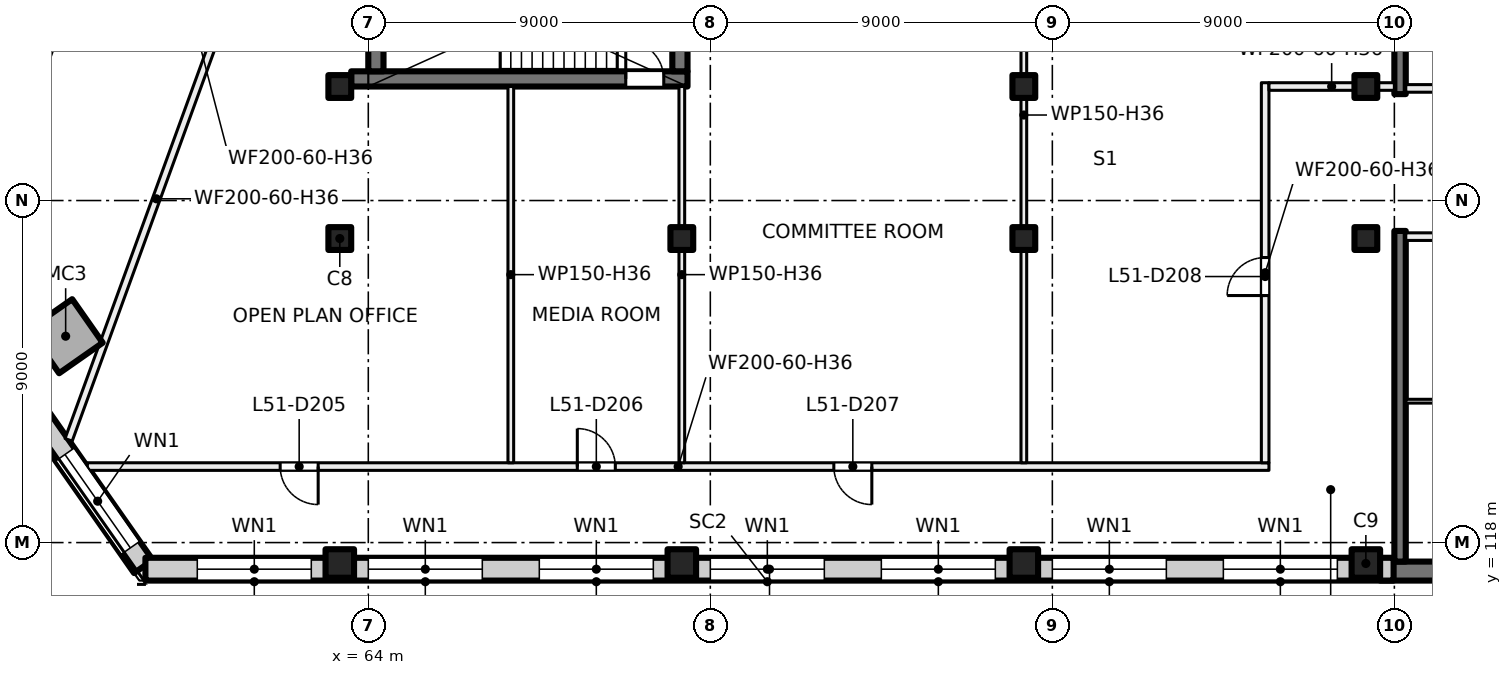
"""IFC4 building model, lengths in metres.
Left out: names, types, materials, properties, quantities, classifications, styles, units other than length and angle.
Written with IfcOpenShell. Run it as: python <this file> out.ifc"""

import sys

from ifc_helpers import new_model, si_unit, direction, frame, frame_2d, origin, origin_2d, place, context, subcontext, project, spatial, rectangle, hollow_rectangle, extrude, element, fill, save


model = new_model("IFC4")
c1 = context("Model", 3, precision=1e-05, world=origin(), true_north=direction((0.0, 1.0)))
c2 = subcontext(c1, "Body", "Model", "MODEL_VIEW")
j1 = project(units=[si_unit("LENGTHUNIT", "METRE"), si_unit("PLANEANGLEUNIT", "RADIAN")], contexts=[c1])
p1 = place(None, origin())
s1 = spatial("IfcSite", under=j1, at=p1, CompositionType="ELEMENT")
p2 = place(p1, origin())
s2 = spatial("IfcBuilding", under=s1, at=p2, CompositionType="ELEMENT")
p3 = place(p2, frame((0.0, 0.0, 216.0)))
s3 = spatial("IfcBuildingStorey", under=s2, at=p3, CompositionType="ELEMENT", Elevation=216.0)
p4 = place(p3, frame((56.036, 123.43, 0.0), z_axis=(0.0, 0.0, 1.0), x_axis=(0.573576436351, -0.819152044289, 0.0)))
e1 = element("IfcColumn", 1, at=p4, inside=s3, PredefinedType="COLUMN", context=c2, shape_type="SweptSolid", body=[
    extrude(hollow_rectangle(XDim=1.4, YDim=1.4, WallThickness=0.032, at=origin_2d()), origin(), (0.0, 0.0, 1.0), 4.0),
])
for number, where, z_axis, x_axis in (
    (2, (63.25, 130.0, 0.0), (0.0, 0.0, 1.0), (1.0, 0.0, 0.0)),
    (3, (81.25, 130.0, 0.0), (0.0, 0.0, 1.0), (1.0, 0.0, 0.0)),
    (4, (90.25, 130.0, 0.0), (0.0, 0.0, 1.0), (1.0, 0.0, 0.0)),
    (5, (63.25, 126.0, 0.0), (0.0, 0.0, 1.0), (1.0, 0.0, 0.0)),
    (6, (72.25, 126.0, 0.0), (0.0, 0.0, 1.0), (1.0, 0.0, 0.0)),
    (7, (81.25, 126.0, 0.0), (0.0, 0.0, 1.0), (1.0, 0.0, 0.0)),
    (8, (90.25, 126.0, 0.0), (0.0, 0.0, 1.0), (1.0, 0.0, 0.0)),
):
    element("IfcColumn", number, at=place(p3, frame(where, z_axis=z_axis, x_axis=x_axis)), inside=s3, PredefinedType="COLUMN", context=c2, shape_type="SweptSolid", body=[
        extrude(rectangle(XDim=0.6, YDim=0.6, at=origin_2d()), origin(), (0.0, 0.0, 1.0), 4.0),
    ])
for number, where, z_axis, x_axis in (
    (9, (63.25, 117.45, 0.0), (0.0, 0.0, 1.0), (1.0, 0.0, 0.0)),
    (10, (72.25, 117.45, 0.0), (0.0, 0.0, 1.0), (1.0, 0.0, 0.0)),
    (11, (81.25, 117.45, 0.0), (0.0, 0.0, 1.0), (1.0, 0.0, 0.0)),
    (12, (90.25, 117.45, 0.0), (0.0, 0.0, 1.0), (1.0, 0.0, 0.0)),
):
    element("IfcColumn", number, at=place(p3, frame(where, z_axis=z_axis, x_axis=x_axis)), inside=s3, PredefinedType="COLUMN", context=c2, shape_type="SweptSolid", body=[
        extrude(rectangle(XDim=0.75, YDim=0.75, at=origin_2d()), origin(), (0.0, 0.0, 1.0), 4.0),
    ])
p5 = place(p3, frame((99.6, 117.25, 0.0), z_axis=(0.0, 0.0, 1.0), x_axis=(-1.0, 0.0, 0.0)))
e13 = element("IfcWall", 13, at=p5, inside=s3, PredefinedType="SHEAR", context=c2, shape_type="SweptSolid", body=[
    extrude(rectangle(XDim=8.975, YDim=0.5, at=frame_2d((4.488, 0.0))), origin(), (0.0, 0.0, 1.0), 4.0),
])
for number, where, z_axis, x_axis in (
    (14, (91.15, 138.5, 0.0), (0.0, 0.0, 1.0), (0.0, -1.0, 0.0)),
    (15, (91.15, 126.2, 0.0), (0.0, 0.0, 1.0), (0.0, -1.0, 0.0)),
):
    element("IfcWall", number, at=place(p3, frame(where, z_axis=z_axis, x_axis=x_axis)), inside=s3, PredefinedType="SHEAR", context=c2, shape_type="SweptSolid", body=[
        extrude(rectangle(XDim=8.7, YDim=0.3, at=frame_2d((4.35, 0.0))), origin(), (0.0, 0.0, 1.0), 4.0),
    ])
p6 = place(p3, frame((63.55, 130.2, 0.0), z_axis=(0.0, 0.0, 1.0), x_axis=(1.0, 0.0, 0.0)))
e16 = element("IfcWall", 16, at=p6, inside=s3, PredefinedType="SHEAR", context=c2, shape_type="SweptSolid", body=[
    extrude(rectangle(XDim=8.85, YDim=0.4, at=frame_2d((4.425, 0.0))), origin(), (0.0, 0.0, 1.0), 4.0),
])
p7 = place(p6, frame((7.225, 0.0, 0.0)))
e17 = element("IfcOpeningElement", 17, at=p7, cuts=e16, PredefinedType="OPENING", context=c2, shape_type="SweptSolid", body=[
    extrude(rectangle(XDim=1.0, YDim=2.1, at=frame_2d((0.5, 1.05))), frame((0.0, 0.21, 0.0), z_axis=(0.0, -1.0, 0.0), x_axis=(1.0, 0.0, 0.0)), (0.0, 0.0, 1.0), 0.42),
])
for number, where, z_axis, x_axis in (
    (18, (64.2, 130.4, 0.0), (0.0, 0.0, 1.0), (0.0, 1.0, 0.0)),
    (19, (72.2, 130.4, 0.0), (0.0, 0.0, 1.0), (0.0, 1.0, 0.0)),
):
    element("IfcWall", number, at=place(p3, frame(where, z_axis=z_axis, x_axis=x_axis)), inside=s3, PredefinedType="SHEAR", context=c2, shape_type="SweptSolid", body=[
        extrude(rectangle(XDim=3.0, YDim=0.4, at=frame_2d((1.5, 0.0))), origin(), (0.0, 0.0, 1.0), 4.0),
    ])
p8 = place(p3, frame((58.083, 117.369, 0.0), z_axis=(0.0, 0.0, 1.0), x_axis=(-0.573573095716, 0.819154383416, 0.0)))
e20 = element("IfcWall", 20, at=p8, inside=s3, PredefinedType="SOLIDWALL", context=c2, shape_type="SweptSolid", body=[
    extrude(rectangle(XDim=26.037, YDim=0.6, at=frame_2d((13.019, 0.0))), origin(), (0.0, 0.0, 1.0), 3.625),
])
p9 = place(p8, frame((0.6, 0.0, 0.9)))
e21 = element("IfcOpeningElement", 21, at=p9, cuts=e20, PredefinedType="OPENING", context=c2, shape_type="SweptSolid", body=[
    extrude(rectangle(XDim=3.0, YDim=2.4, at=frame_2d((1.5, 1.2))), frame((0.0, 0.31, 0.0), z_axis=(0.0, -1.0, 0.0), x_axis=(1.0, 0.0, 0.0)), (0.0, 0.0, 1.0), 0.62),
])
p10 = place(p8, frame((4.829, 0.0, 0.9)))
e22 = element("IfcOpeningElement", 22, at=p10, cuts=e20, PredefinedType="OPENING", context=c2, shape_type="SweptSolid", body=[
    extrude(rectangle(XDim=3.0, YDim=2.4, at=frame_2d((1.5, 1.2))), frame((0.0, 0.31, 0.0), z_axis=(0.0, -1.0, 0.0), x_axis=(1.0, 0.0, 0.0)), (0.0, 0.0, 1.0), 0.62),
])
p11 = place(p8, frame((9.209, 0.0, 0.9)))
e23 = element("IfcOpeningElement", 23, at=p11, cuts=e20, PredefinedType="OPENING", context=c2, shape_type="SweptSolid", body=[
    extrude(rectangle(XDim=3.0, YDim=2.4, at=frame_2d((1.5, 1.2))), frame((0.0, 0.31, 0.0), z_axis=(0.0, -1.0, 0.0), x_axis=(1.0, 0.0, 0.0)), (0.0, 0.0, 1.0), 0.62),
])
p12 = place(p8, frame((13.588, 0.0, 0.9)))
e24 = element("IfcOpeningElement", 24, at=p12, cuts=e20, PredefinedType="OPENING", context=c2, shape_type="SweptSolid", body=[
    extrude(rectangle(XDim=3.0, YDim=2.4, at=frame_2d((1.5, 1.2))), frame((0.0, 0.31, 0.0), z_axis=(0.0, -1.0, 0.0), x_axis=(1.0, 0.0, 0.0)), (0.0, 0.0, 1.0), 0.62),
])
p13 = place(p8, frame((17.968, 0.0, 0.9)))
e25 = element("IfcOpeningElement", 25, at=p13, cuts=e20, PredefinedType="OPENING", context=c2, shape_type="SweptSolid", body=[
    extrude(rectangle(XDim=3.0, YDim=2.4, at=frame_2d((1.5, 1.2))), frame((0.0, 0.31, 0.0), z_axis=(0.0, -1.0, 0.0), x_axis=(1.0, 0.0, 0.0)), (0.0, 0.0, 1.0), 0.62),
])
p14 = place(p8, frame((22.198, 0.0, 0.9)))
e26 = element("IfcOpeningElement", 26, at=p14, cuts=e20, PredefinedType="OPENING", context=c2, shape_type="SweptSolid", body=[
    extrude(rectangle(XDim=3.0, YDim=2.4, at=frame_2d((1.5, 1.2))), frame((0.0, 0.31, 0.0), z_axis=(0.0, -1.0, 0.0), x_axis=(1.0, 0.0, 0.0)), (0.0, 0.0, 1.0), 0.62),
])
p15 = place(p3, frame((90.98, 117.3, 0.0), z_axis=(0.0, 0.0, 1.0), x_axis=(-1.0, 0.0, 0.0)))
e27 = element("IfcWall", 27, at=p15, inside=s3, PredefinedType="SOLIDWALL", context=c2, shape_type="SweptSolid", body=[
    extrude(rectangle(XDim=32.845, YDim=0.6, at=frame_2d((16.422, 0.0))), origin(), (0.0, 0.0, 1.0), 3.625),
])
p16 = place(p15, frame((1.48, 0.0, 0.9)))
e28 = element("IfcOpeningElement", 28, at=p16, cuts=e27, PredefinedType="OPENING", context=c2, shape_type="SweptSolid", body=[
    extrude(rectangle(XDim=3.0, YDim=2.4, at=frame_2d((1.5, 1.2))), frame((0.0, 0.31, 0.0), z_axis=(0.0, -1.0, 0.0), x_axis=(1.0, 0.0, 0.0)), (0.0, 0.0, 1.0), 0.62),
])
p17 = place(p15, frame((5.98, 0.0, 0.9)))
e29 = element("IfcOpeningElement", 29, at=p17, cuts=e27, PredefinedType="OPENING", context=c2, shape_type="SweptSolid", body=[
    extrude(rectangle(XDim=3.0, YDim=2.4, at=frame_2d((1.5, 1.2))), frame((0.0, 0.31, 0.0), z_axis=(0.0, -1.0, 0.0), x_axis=(1.0, 0.0, 0.0)), (0.0, 0.0, 1.0), 0.62),
])
p18 = place(p15, frame((10.48, 0.0, 0.9)))
e30 = element("IfcOpeningElement", 30, at=p18, cuts=e27, PredefinedType="OPENING", context=c2, shape_type="SweptSolid", body=[
    extrude(rectangle(XDim=3.0, YDim=2.4, at=frame_2d((1.5, 1.2))), frame((0.0, 0.31, 0.0), z_axis=(0.0, -1.0, 0.0), x_axis=(1.0, 0.0, 0.0)), (0.0, 0.0, 1.0), 0.62),
])
p19 = place(p15, frame((14.98, 0.0, 0.9)))
e31 = element("IfcOpeningElement", 31, at=p19, cuts=e27, PredefinedType="OPENING", context=c2, shape_type="SweptSolid", body=[
    extrude(rectangle(XDim=3.0, YDim=2.4, at=frame_2d((1.5, 1.2))), frame((0.0, 0.31, 0.0), z_axis=(0.0, -1.0, 0.0), x_axis=(1.0, 0.0, 0.0)), (0.0, 0.0, 1.0), 0.62),
])
p20 = place(p15, frame((19.48, 0.0, 0.9)))
e32 = element("IfcOpeningElement", 32, at=p20, cuts=e27, PredefinedType="OPENING", context=c2, shape_type="SweptSolid", body=[
    extrude(rectangle(XDim=3.0, YDim=2.4, at=frame_2d((1.5, 1.2))), frame((0.0, 0.31, 0.0), z_axis=(0.0, -1.0, 0.0), x_axis=(1.0, 0.0, 0.0)), (0.0, 0.0, 1.0), 0.62),
])
p21 = place(p15, frame((23.98, 0.0, 0.9)))
e33 = element("IfcOpeningElement", 33, at=p21, cuts=e27, PredefinedType="OPENING", context=c2, shape_type="SweptSolid", body=[
    extrude(rectangle(XDim=3.0, YDim=2.4, at=frame_2d((1.5, 1.2))), frame((0.0, 0.31, 0.0), z_axis=(0.0, -1.0, 0.0), x_axis=(1.0, 0.0, 0.0)), (0.0, 0.0, 1.0), 0.62),
])
p22 = place(p15, frame((28.48, 0.0, 0.9)))
e34 = element("IfcOpeningElement", 34, at=p22, cuts=e27, PredefinedType="OPENING", context=c2, shape_type="SweptSolid", body=[
    extrude(rectangle(XDim=3.0, YDim=2.4, at=frame_2d((1.5, 1.2))), frame((0.0, 0.31, 0.0), z_axis=(0.0, -1.0, 0.0), x_axis=(1.0, 0.0, 0.0)), (0.0, 0.0, 1.0), 0.62),
])
p23 = place(p3, frame((95.25, 126.05, 0.0), z_axis=(0.0, 0.0, 1.0), x_axis=(-1.0, 0.0, 0.0)))
e35 = element("IfcWall", 35, at=p23, inside=s3, PredefinedType="PARTITIONING", context=c2, shape_type="SweptSolid", body=[
    extrude(rectangle(XDim=3.95, YDim=0.2, at=frame_2d((1.975, 0.0))), origin(), (0.0, 0.0, 1.0), 3.625),
])
p24 = place(p23, frame((0.3, 0.0, 0.0)))
e36 = element("IfcOpeningElement", 36, at=p24, cuts=e35, PredefinedType="OPENING", context=c2, shape_type="SweptSolid", body=[
    extrude(rectangle(XDim=1.2, YDim=2.1, at=frame_2d((0.6, 1.05))), frame((0.0, 0.11, 0.0), z_axis=(0.0, -1.0, 0.0), x_axis=(1.0, 0.0, 0.0)), (0.0, 0.0, 1.0), 0.22),
])
p25 = place(p3, frame((93.4, 121.72, 0.0), z_axis=(0.0, 0.0, 1.0), x_axis=(-1.0, 0.0, 0.0)))
e37 = element("IfcWall", 37, at=p25, inside=s3, PredefinedType="PARTITIONING", context=c2, shape_type="SweptSolid", body=[
    extrude(rectangle(XDim=2.1, YDim=0.1, at=frame_2d((1.05, 0.0))), origin(), (0.0, 0.0, 1.0), 3.625),
])
p26 = place(p3, frame((91.3, 129.95, 0.0), z_axis=(0.0, 0.0, 1.0), x_axis=(1.0, 0.0, 0.0)))
e38 = element("IfcWall", 38, at=p26, inside=s3, PredefinedType="PARTITIONING", context=c2, shape_type="SweptSolid", body=[
    extrude(rectangle(XDim=3.95, YDim=0.2, at=frame_2d((1.975, 0.0))), origin(), (0.0, 0.0, 1.0), 3.625),
])
p27 = place(p26, frame((2.45, 0.0, 0.0)))
e39 = element("IfcOpeningElement", 39, at=p27, cuts=e38, PredefinedType="OPENING", context=c2, shape_type="SweptSolid", body=[
    extrude(rectangle(XDim=1.2, YDim=2.1, at=frame_2d((0.6, 1.05))), frame((0.0, 0.11, 0.0), z_axis=(0.0, -1.0, 0.0), x_axis=(1.0, 0.0, 0.0)), (0.0, 0.0, 1.0), 0.22),
])
p28 = place(p3, frame((53.314, 124.703, 0.0), z_axis=(0.0, 0.0, 1.0), x_axis=(0.341964791562, 0.939712765334, 0.0)))
e40 = element("IfcWall", 40, at=p28, inside=s3, PredefinedType="PARTITIONING", context=c2, shape_type="SweptSolid", body=[
    extrude(rectangle(XDim=10.697, YDim=0.2, at=frame_2d((5.348, 0.0))), origin(), (0.0, 0.0, 1.0), 3.625),
])
p29 = place(p3, frame((56.114, 120.704, 0.0), z_axis=(0.0, 0.0, 1.0), x_axis=(0.342069822002, 0.939674537739, 0.0)))
e41 = element("IfcWall", 41, at=p29, inside=s3, PredefinedType="PARTITIONING", context=c2, shape_type="SweptSolid", body=[
    extrude(rectangle(XDim=13.497, YDim=0.2, at=frame_2d((6.749, 0.0))), origin(), (0.0, 0.0, 1.0), 3.625),
])
p30 = place(p3, frame((56.607, 120.0, 0.0), z_axis=(0.0, 0.0, 1.0), x_axis=(1.0, 0.0, 0.0)))
e42 = element("IfcWall", 42, at=p30, inside=s3, PredefinedType="PARTITIONING", context=c2, shape_type="SweptSolid", body=[
    extrude(rectangle(XDim=31.093, YDim=0.2, at=frame_2d((15.546, 0.0))), origin(), (0.0, 0.0, 1.0), 3.625),
])
p31 = place(p30, frame((5.074, 0.0, 0.0)))
e43 = element("IfcOpeningElement", 43, at=p31, cuts=e42, PredefinedType="OPENING", context=c2, shape_type="SweptSolid", body=[
    extrude(rectangle(XDim=1.0, YDim=2.1, at=frame_2d((0.5, 1.05))), frame((0.0, 0.11, 0.0), z_axis=(0.0, -1.0, 0.0), x_axis=(1.0, 0.0, 0.0)), (0.0, 0.0, 1.0), 0.22),
])
p32 = place(p30, frame((12.893, 0.0, 0.0)))
e44 = element("IfcOpeningElement", 44, at=p32, cuts=e42, PredefinedType="OPENING", context=c2, shape_type="SweptSolid", body=[
    extrude(rectangle(XDim=1.0, YDim=2.1, at=frame_2d((0.5, 1.05))), frame((0.0, 0.11, 0.0), z_axis=(0.0, -1.0, 0.0), x_axis=(1.0, 0.0, 0.0)), (0.0, 0.0, 1.0), 0.22),
])
p33 = place(p30, frame((19.643, 0.0, 0.0)))
e45 = element("IfcOpeningElement", 45, at=p33, cuts=e42, PredefinedType="OPENING", context=c2, shape_type="SweptSolid", body=[
    extrude(rectangle(XDim=1.0, YDim=2.1, at=frame_2d((0.5, 1.05))), frame((0.0, 0.11, 0.0), z_axis=(0.0, -1.0, 0.0), x_axis=(1.0, 0.0, 0.0)), (0.0, 0.0, 1.0), 0.22),
])
for number, where, z_axis, x_axis in (
    (46, (67.75, 120.1, 0.0), (0.0, 0.0, 1.0), (0.0, 1.0, 0.0)),
    (47, (72.25, 120.1, 0.0), (0.0, 0.0, 1.0), (0.0, 1.0, 0.0)),
):
    element("IfcWall", number, at=place(p3, frame(where, z_axis=z_axis, x_axis=x_axis)), inside=s3, PredefinedType="PARTITIONING", context=c2, shape_type="SweptSolid", body=[
        extrude(rectangle(XDim=9.9, YDim=0.15, at=frame_2d((4.95, 0.0))), origin(), (0.0, 0.0, 1.0), 3.625),
    ])
p34 = place(p3, frame((81.25, 120.1, 0.0), z_axis=(0.0, 0.0, 1.0), x_axis=(0.0, 1.0, 0.0)))
e48 = element("IfcWall", 48, at=p34, inside=s3, PredefinedType="PARTITIONING", context=c2, shape_type="SweptSolid", body=[
    extrude(rectangle(XDim=18.3, YDim=0.15, at=frame_2d((9.15, 0.0))), origin(), (0.0, 0.0, 1.0), 3.625),
])
p35 = place(p3, frame((87.6, 120.1, 0.0), z_axis=(0.0, 0.0, 1.0), x_axis=(0.0, 1.0, 0.0)))
e49 = element("IfcWall", 49, at=p35, inside=s3, PredefinedType="PARTITIONING", context=c2, shape_type="SweptSolid", body=[
    extrude(rectangle(XDim=10.0, YDim=0.2, at=frame_2d((5.0, 0.0))), origin(), (0.0, 0.0, 1.0), 3.625),
])
p36 = place(p35, frame((4.4, 0.0, 0.0)))
e50 = element("IfcOpeningElement", 50, at=p36, cuts=e49, PredefinedType="OPENING", context=c2, shape_type="SweptSolid", body=[
    extrude(rectangle(XDim=1.0, YDim=2.1, at=frame_2d((0.5, 1.05))), frame((0.0, 0.11, 0.0), z_axis=(0.0, -1.0, 0.0), x_axis=(1.0, 0.0, 0.0)), (0.0, 0.0, 1.0), 0.22),
])
p37 = place(p3, frame((87.7, 130.0, 0.0), z_axis=(0.0, 0.0, 1.0), x_axis=(1.0, 0.0, 0.0)))
e51 = element("IfcWall", 51, at=p37, inside=s3, PredefinedType="PARTITIONING", context=c2, shape_type="SweptSolid", body=[
    extrude(rectangle(XDim=3.3, YDim=0.2, at=frame_2d((1.65, 0.0))), origin(), (0.0, 0.0, 1.0), 3.625),
])
p38 = place(p9, origin())
e52 = element("IfcWindow", 52, at=p38, inside=s3, PartitioningType="SINGLE_PANEL", PredefinedType="WINDOW", context=c2, shape_type="SweptSolid", body=[
    extrude(rectangle(XDim=3.0, YDim=2.4, at=frame_2d((1.5, 1.2))), frame((0.0, 0.03, 0.0), z_axis=(0.0, -1.0, 0.0), x_axis=(1.0, 0.0, 0.0)), (0.0, 0.0, 1.0), 0.06),
])
fill(e21, e52)
p39 = place(p16, origin())
e53 = element("IfcWindow", 53, at=p39, inside=s3, PartitioningType="SINGLE_PANEL", PredefinedType="WINDOW", context=c2, shape_type="SweptSolid", body=[
    extrude(rectangle(XDim=3.0, YDim=2.4, at=frame_2d((1.5, 1.2))), frame((0.0, 0.03, 0.0), z_axis=(0.0, -1.0, 0.0), x_axis=(1.0, 0.0, 0.0)), (0.0, 0.0, 1.0), 0.06),
])
fill(e28, e53)
p40 = place(p17, origin())
e54 = element("IfcWindow", 54, at=p40, inside=s3, PartitioningType="SINGLE_PANEL", PredefinedType="WINDOW", context=c2, shape_type="SweptSolid", body=[
    extrude(rectangle(XDim=3.0, YDim=2.4, at=frame_2d((1.5, 1.2))), frame((0.0, 0.03, 0.0), z_axis=(0.0, -1.0, 0.0), x_axis=(1.0, 0.0, 0.0)), (0.0, 0.0, 1.0), 0.06),
])
fill(e29, e54)
p41 = place(p18, origin())
e55 = element("IfcWindow", 55, at=p41, inside=s3, PartitioningType="SINGLE_PANEL", PredefinedType="WINDOW", context=c2, shape_type="SweptSolid", body=[
    extrude(rectangle(XDim=3.0, YDim=2.4, at=frame_2d((1.5, 1.2))), frame((0.0, 0.03, 0.0), z_axis=(0.0, -1.0, 0.0), x_axis=(1.0, 0.0, 0.0)), (0.0, 0.0, 1.0), 0.06),
])
fill(e30, e55)
p42 = place(p19, origin())
e56 = element("IfcWindow", 56, at=p42, inside=s3, PartitioningType="SINGLE_PANEL", PredefinedType="WINDOW", context=c2, shape_type="SweptSolid", body=[
    extrude(rectangle(XDim=3.0, YDim=2.4, at=frame_2d((1.5, 1.2))), frame((0.0, 0.03, 0.0), z_axis=(0.0, -1.0, 0.0), x_axis=(1.0, 0.0, 0.0)), (0.0, 0.0, 1.0), 0.06),
])
fill(e31, e56)
p43 = place(p20, origin())
e57 = element("IfcWindow", 57, at=p43, inside=s3, PartitioningType="SINGLE_PANEL", PredefinedType="WINDOW", context=c2, shape_type="SweptSolid", body=[
    extrude(rectangle(XDim=3.0, YDim=2.4, at=frame_2d((1.5, 1.2))), frame((0.0, 0.03, 0.0), z_axis=(0.0, -1.0, 0.0), x_axis=(1.0, 0.0, 0.0)), (0.0, 0.0, 1.0), 0.06),
])
fill(e32, e57)
p44 = place(p21, origin())
e58 = element("IfcWindow", 58, at=p44, inside=s3, PartitioningType="SINGLE_PANEL", PredefinedType="WINDOW", context=c2, shape_type="SweptSolid", body=[
    extrude(rectangle(XDim=3.0, YDim=2.4, at=frame_2d((1.5, 1.2))), frame((0.0, 0.03, 0.0), z_axis=(0.0, -1.0, 0.0), x_axis=(1.0, 0.0, 0.0)), (0.0, 0.0, 1.0), 0.06),
])
fill(e33, e58)
p45 = place(p22, origin())
e59 = element("IfcWindow", 59, at=p45, inside=s3, PartitioningType="SINGLE_PANEL", PredefinedType="WINDOW", context=c2, shape_type="SweptSolid", body=[
    extrude(rectangle(XDim=3.0, YDim=2.4, at=frame_2d((1.5, 1.2))), frame((0.0, 0.03, 0.0), z_axis=(0.0, -1.0, 0.0), x_axis=(1.0, 0.0, 0.0)), (0.0, 0.0, 1.0), 0.06),
])
fill(e34, e59)
p46 = place(p7, origin())
e60 = element("IfcDoor", 60, at=p46, inside=s3, OperationType="SINGLE_SWING_LEFT", PredefinedType="DOOR", context=c2, shape_type="SweptSolid", body=[
    extrude(rectangle(XDim=1.0, YDim=2.1, at=frame_2d((0.5, 1.05))), frame((0.0, 0.025, 0.0), z_axis=(0.0, -1.0, 0.0), x_axis=(1.0, 0.0, 0.0)), (0.0, 0.0, 1.0), 0.05),
])
fill(e17, e60)
p47 = place(p31, origin())
e61 = element("IfcDoor", 61, at=p47, inside=s3, OperationType="SINGLE_SWING_RIGHT", PredefinedType="DOOR", context=c2, shape_type="SweptSolid", body=[
    extrude(rectangle(XDim=1.0, YDim=2.1, at=frame_2d((0.5, 1.05))), frame((0.0, 0.025, 0.0), z_axis=(0.0, -1.0, 0.0), x_axis=(1.0, 0.0, 0.0)), (0.0, 0.0, 1.0), 0.05),
])
fill(e43, e61)
p48 = place(p32, origin())
e62 = element("IfcDoor", 62, at=p48, inside=s3, OperationType="SINGLE_SWING_LEFT", PredefinedType="DOOR", context=c2, shape_type="SweptSolid", body=[
    extrude(rectangle(XDim=1.0, YDim=2.1, at=frame_2d((0.5, 1.05))), frame((0.0, 0.025, 0.0), z_axis=(0.0, -1.0, 0.0), x_axis=(1.0, 0.0, 0.0)), (0.0, 0.0, 1.0), 0.05),
])
fill(e44, e62)
p49 = place(p33, origin())
e63 = element("IfcDoor", 63, at=p49, inside=s3, OperationType="SINGLE_SWING_RIGHT", PredefinedType="DOOR", context=c2, shape_type="SweptSolid", body=[
    extrude(rectangle(XDim=1.0, YDim=2.1, at=frame_2d((0.5, 1.05))), frame((0.0, 0.025, 0.0), z_axis=(0.0, -1.0, 0.0), x_axis=(1.0, 0.0, 0.0)), (0.0, 0.0, 1.0), 0.05),
])
fill(e45, e63)
p50 = place(p36, origin())
e64 = element("IfcDoor", 64, at=p50, inside=s3, OperationType="SINGLE_SWING_LEFT", PredefinedType="DOOR", context=c2, shape_type="SweptSolid", body=[
    extrude(rectangle(XDim=1.0, YDim=2.1, at=frame_2d((0.5, 1.05))), frame((0.0, 0.025, 0.0), z_axis=(0.0, -1.0, 0.0), x_axis=(1.0, 0.0, 0.0)), (0.0, 0.0, 1.0), 0.05),
])
fill(e50, e64)
save(model, sys.argv[1])
